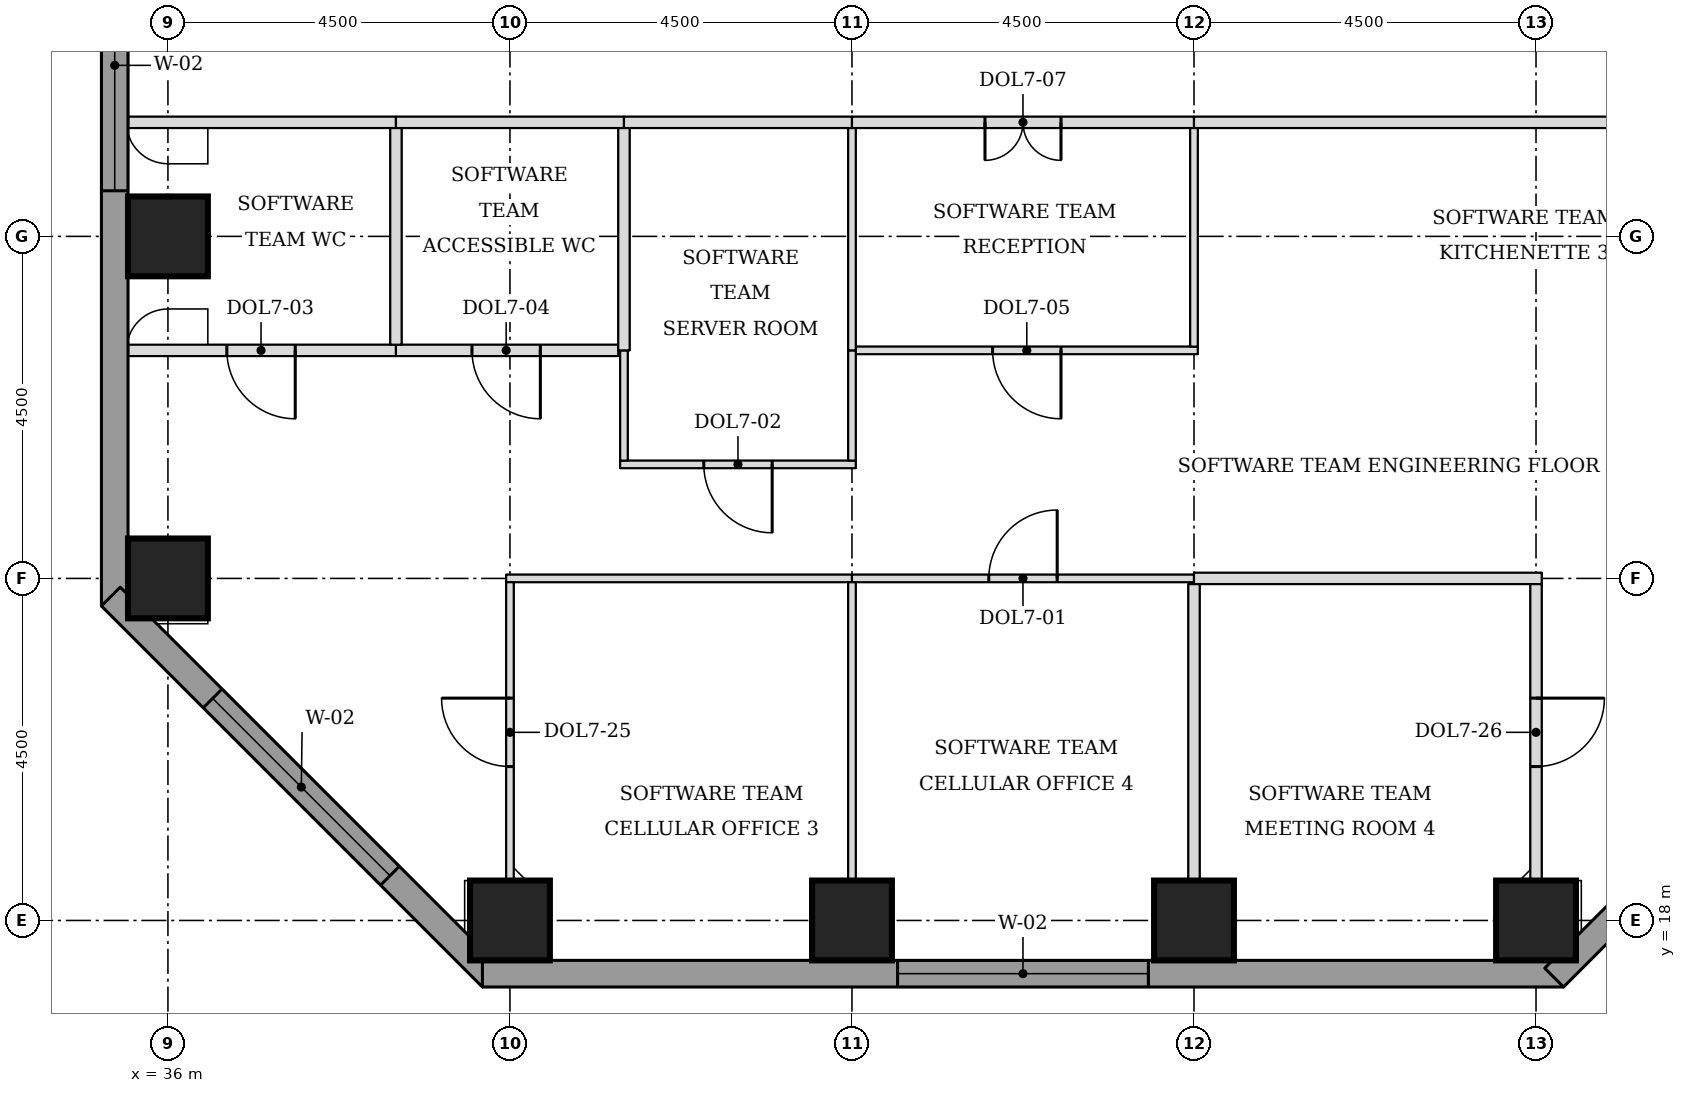
"""IFC4 building model, lengths in metres.
Left out: names, types, materials, properties, quantities, classifications, styles, units other than length and angle.
Written with IfcOpenShell. Run it as: python <this file> out.ifc"""

import sys

from ifc_helpers import new_model, si_unit, direction, frame, frame_2d, origin, origin_2d, place, context, subcontext, project, spatial, rectangle, extrude, element, fill, save


model = new_model("IFC4")
c1 = context("Model", 3, precision=1e-05, world=origin(), true_north=direction((0.0, 1.0)))
c2 = subcontext(c1, "Body", "Model", "MODEL_VIEW")
j1 = project(units=[si_unit("LENGTHUNIT", "METRE"), si_unit("PLANEANGLEUNIT", "RADIAN")], contexts=[c1])
p1 = place(None, origin())
s1 = spatial("IfcSite", under=j1, at=p1, CompositionType="ELEMENT")
p2 = place(p1, origin())
s2 = spatial("IfcBuilding", under=s1, at=p2, CompositionType="ELEMENT")
p3 = place(p2, frame((0.0, 0.0, 130.7)))
s3 = spatial("IfcBuildingStorey", under=s2, at=p3, CompositionType="ELEMENT", Elevation=130.7)
for number, where, z_axis, x_axis in (
    (1, (40.5, 18.0, 0.0), (0.0, 0.0, 1.0), (1.0, 0.0, 0.0)),
    (2, (45.0, 18.0, 0.0), (0.0, 0.0, 1.0), (1.0, 0.0, 0.0)),
    (3, (49.5, 18.0, 0.0), (0.0, 0.0, 1.0), (1.0, 0.0, 0.0)),
    (4, (54.0, 18.0, 0.0), (0.0, 0.0, 1.0), (1.0, 0.0, 0.0)),
    (5, (36.0, 22.5, 0.0), (0.0, 0.0, 1.0), (1.0, 0.0, 0.0)),
    (6, (36.0, 27.0, 0.0), (0.0, 0.0, 1.0), (1.0, 0.0, 0.0)),
):
    element("IfcColumn", number, at=place(p3, frame(where, z_axis=z_axis, x_axis=x_axis)), inside=s3, PredefinedType="COLUMN", context=c2, shape_type="SweptSolid", body=[
        extrude(rectangle(XDim=1.05, YDim=1.05, at=origin_2d()), origin(), (0.0, 0.0, 1.0), 3.7),
    ])
p4 = place(p3, frame((35.3, 39.975, 0.0), z_axis=(0.0, 0.0, 1.0), x_axis=(0.0, -1.0, 0.0)))
e7 = element("IfcWall", 7, at=p4, inside=s3, PredefinedType="STANDARD", context=c2, shape_type="SweptSolid", body=[
    extrude(rectangle(XDim=17.837, YDim=0.35, at=frame_2d((8.919, 0.0))), origin(), (0.0, 0.0, 1.0), 3.525),
])
p5 = place(p4, frame((0.5, 0.0, 0.9)))
e8 = element("IfcOpeningElement", 8, at=p5, cuts=e7, PredefinedType="OPENING", context=c2, shape_type="SweptSolid", body=[
    extrude(rectangle(XDim=3.3, YDim=1.9, at=frame_2d((1.65, 0.95))), frame((0.0, 0.185, 0.0), z_axis=(0.0, -1.0, 0.0), x_axis=(1.0, 0.0, 0.0)), (0.0, 0.0, 1.0), 0.37),
])
p6 = place(p4, frame((9.075, 0.0, 0.9)))
e9 = element("IfcOpeningElement", 9, at=p6, cuts=e7, PredefinedType="OPENING", context=c2, shape_type="SweptSolid", body=[
    extrude(rectangle(XDim=3.3, YDim=1.9, at=frame_2d((1.65, 0.95))), frame((0.0, 0.185, 0.0), z_axis=(0.0, -1.0, 0.0), x_axis=(1.0, 0.0, 0.0)), (0.0, 0.0, 1.0), 0.37),
])
p7 = place(p3, frame((35.249, 22.261, 0.0), z_axis=(0.0, 0.0, 1.0), x_axis=(0.707106781187, -0.707106781187, 0.0)))
e10 = element("IfcWall", 10, at=p7, inside=s3, PredefinedType="STANDARD", context=c2, shape_type="SweptSolid", body=[
    extrude(rectangle(XDim=7.089, YDim=0.35, at=frame_2d((3.544, 0.0))), origin(), (0.0, 0.0, 1.0), 3.525),
])
p8 = place(p7, frame((1.894, 0.0, 0.9)))
e11 = element("IfcOpeningElement", 11, at=p8, cuts=e10, PredefinedType="OPENING", context=c2, shape_type="SweptSolid", body=[
    extrude(rectangle(XDim=3.3, YDim=1.9, at=frame_2d((1.65, 0.95))), frame((0.0, 0.185, 0.0), z_axis=(0.0, -1.0, 0.0), x_axis=(1.0, 0.0, 0.0)), (0.0, 0.0, 1.0), 0.37),
])
p9 = place(p3, frame((40.138, 17.3, 0.0), z_axis=(0.0, 0.0, 1.0), x_axis=(1.0, 0.0, 0.0)))
e12 = element("IfcWall", 12, at=p9, inside=s3, PredefinedType="STANDARD", context=c2, shape_type="SweptSolid", body=[
    extrude(rectangle(XDim=14.225, YDim=0.35, at=frame_2d((7.112, 0.0))), origin(), (0.0, 0.0, 1.0), 3.525),
])
p10 = place(p9, frame((5.462, 0.0, 0.9)))
e13 = element("IfcOpeningElement", 13, at=p10, cuts=e12, PredefinedType="OPENING", context=c2, shape_type="SweptSolid", body=[
    extrude(rectangle(XDim=3.3, YDim=1.9, at=frame_2d((1.65, 0.95))), frame((0.0, 0.185, 0.0), z_axis=(0.0, -1.0, 0.0), x_axis=(1.0, 0.0, 0.0)), (0.0, 0.0, 1.0), 0.37),
])
p11 = place(p3, frame((54.239, 17.249, 0.0), z_axis=(0.0, 0.0, 1.0), x_axis=(0.707106781187, 0.707106781187, 0.0)))
e14 = element("IfcWall", 14, at=p11, inside=s3, PredefinedType="STANDARD", context=c2, shape_type="SweptSolid", body=[
    extrude(rectangle(XDim=7.089, YDim=0.35, at=frame_2d((3.544, 0.0))), origin(), (0.0, 0.0, 1.0), 3.525),
])
p12 = place(p11, frame((1.894, 0.0, 0.9)))
e15 = element("IfcOpeningElement", 15, at=p12, cuts=e14, PredefinedType="OPENING", context=c2, shape_type="SweptSolid", body=[
    extrude(rectangle(XDim=3.3, YDim=1.9, at=frame_2d((1.65, 0.95))), frame((0.0, 0.185, 0.0), z_axis=(0.0, -1.0, 0.0), x_axis=(1.0, 0.0, 0.0)), (0.0, 0.0, 1.0), 0.37),
])
p13 = place(p3, frame((40.45, 22.5, 0.0), z_axis=(0.0, 0.0, 1.0), x_axis=(1.0, 0.0, 0.0)))
e16 = element("IfcWall", 16, at=p13, inside=s3, PredefinedType="PARTITIONING", context=c2, shape_type="SweptSolid", body=[
    extrude(rectangle(XDim=4.55, YDim=0.1, at=frame_2d((2.275, 0.0))), origin(), (0.0, 0.0, 1.0), 2.55),
])
p14 = place(p3, frame((45.0, 22.5, 0.0), z_axis=(0.0, 0.0, 1.0), x_axis=(1.0, 0.0, 0.0)))
e17 = element("IfcWall", 17, at=p14, inside=s3, PredefinedType="PARTITIONING", context=c2, shape_type="SweptSolid", body=[
    extrude(rectangle(XDim=4.5, YDim=0.1, at=frame_2d((2.25, 0.0))), origin(), (0.0, 0.0, 1.0), 2.55),
])
p15 = place(p14, frame((1.8, 0.0, 0.0)))
e18 = element("IfcOpeningElement", 18, at=p15, cuts=e17, PredefinedType="OPENING", context=c2, shape_type="SweptSolid", body=[
    extrude(rectangle(XDim=0.9, YDim=2.1, at=frame_2d((0.45, 1.05))), frame((0.0, 0.06, 0.0), z_axis=(0.0, -1.0, 0.0), x_axis=(1.0, 0.0, 0.0)), (0.0, 0.0, 1.0), 0.12),
])
p16 = place(p3, frame((49.5, 22.5, 0.0), z_axis=(0.0, 0.0, 1.0), x_axis=(1.0, 0.0, 0.0)))
e19 = element("IfcWall", 19, at=p16, inside=s3, PredefinedType="PARTITIONING", context=c2, shape_type="SweptSolid", body=[
    extrude(rectangle(XDim=4.575, YDim=0.15, at=frame_2d((2.288, 0.0))), origin(), (0.0, 0.0, 1.0), 2.55),
])
p17 = place(p3, frame((41.95, 24.0, 0.0), z_axis=(0.0, 0.0, 1.0), x_axis=(1.0, 0.0, 0.0)))
e20 = element("IfcWall", 20, at=p17, inside=s3, PredefinedType="PARTITIONING", context=c2, shape_type="SweptSolid", body=[
    extrude(rectangle(XDim=3.1, YDim=0.1, at=frame_2d((1.55, 0.0))), origin(), (0.0, 0.0, 1.0), 3.55),
])
p18 = place(p17, frame((1.1, 0.0, 0.0)))
e21 = element("IfcOpeningElement", 21, at=p18, cuts=e20, PredefinedType="OPENING", context=c2, shape_type="SweptSolid", body=[
    extrude(rectangle(XDim=0.9, YDim=2.1, at=frame_2d((0.45, 1.05))), frame((0.0, 0.06, 0.0), z_axis=(0.0, -1.0, 0.0), x_axis=(1.0, 0.0, 0.0)), (0.0, 0.0, 1.0), 0.12),
])
p19 = place(p3, frame((35.475, 25.5, 0.0), z_axis=(0.0, 0.0, 1.0), x_axis=(1.0, 0.0, 0.0)))
e22 = element("IfcWall", 22, at=p19, inside=s3, PredefinedType="PARTITIONING", context=c2, shape_type="SweptSolid", body=[
    extrude(rectangle(XDim=3.525, YDim=0.15, at=frame_2d((1.762, 0.0))), origin(), (0.0, 0.0, 1.0), 3.55),
])
p20 = place(p19, frame((1.3, 0.0, 0.0)))
e23 = element("IfcOpeningElement", 23, at=p20, cuts=e22, PredefinedType="OPENING", context=c2, shape_type="SweptSolid", body=[
    extrude(rectangle(XDim=0.9, YDim=2.1, at=frame_2d((0.45, 1.05))), frame((0.0, 0.085, 0.0), z_axis=(0.0, -1.0, 0.0), x_axis=(1.0, 0.0, 0.0)), (0.0, 0.0, 1.0), 0.17),
])
p21 = place(p3, frame((39.0, 25.5, 0.0), z_axis=(0.0, 0.0, 1.0), x_axis=(1.0, 0.0, 0.0)))
e24 = element("IfcWall", 24, at=p21, inside=s3, PredefinedType="PARTITIONING", context=c2, shape_type="SweptSolid", body=[
    extrude(rectangle(XDim=2.925, YDim=0.15, at=frame_2d((1.462, 0.0))), origin(), (0.0, 0.0, 1.0), 3.55),
])
p22 = place(p21, frame((1.0, 0.0, 0.0)))
e25 = element("IfcOpeningElement", 25, at=p22, cuts=e24, PredefinedType="OPENING", context=c2, shape_type="SweptSolid", body=[
    extrude(rectangle(XDim=0.9, YDim=2.1, at=frame_2d((0.45, 1.05))), frame((0.0, 0.085, 0.0), z_axis=(0.0, -1.0, 0.0), x_axis=(1.0, 0.0, 0.0)), (0.0, 0.0, 1.0), 0.17),
])
p23 = place(p3, frame((45.05, 25.5, 0.0), z_axis=(0.0, 0.0, 1.0), x_axis=(1.0, 0.0, 0.0)))
e26 = element("IfcWall", 26, at=p23, inside=s3, PredefinedType="PARTITIONING", context=c2, shape_type="SweptSolid", body=[
    extrude(rectangle(XDim=4.5, YDim=0.1, at=frame_2d((2.25, 0.0))), origin(), (0.0, 0.0, 1.0), 3.55),
])
p24 = place(p23, frame((1.8, 0.0, 0.0)))
e27 = element("IfcOpeningElement", 27, at=p24, cuts=e26, PredefinedType="OPENING", context=c2, shape_type="SweptSolid", body=[
    extrude(rectangle(XDim=0.9, YDim=2.1, at=frame_2d((0.45, 1.05))), frame((0.0, 0.06, 0.0), z_axis=(0.0, -1.0, 0.0), x_axis=(1.0, 0.0, 0.0)), (0.0, 0.0, 1.0), 0.12),
])
p25 = place(p3, frame((35.475, 28.5, 0.0), z_axis=(0.0, 0.0, 1.0), x_axis=(1.0, 0.0, 0.0)))
e28 = element("IfcWall", 28, at=p25, inside=s3, PredefinedType="PARTITIONING", context=c2, shape_type="SweptSolid", body=[
    extrude(rectangle(XDim=3.525, YDim=0.15, at=frame_2d((1.762, 0.0))), origin(), (0.0, 0.0, 1.0), 3.55),
])
for number, where, z_axis, x_axis in (
    (29, (39.0, 28.5, 0.0), (0.0, 0.0, 1.0), (1.0, 0.0, 0.0)),
    (30, (42.0, 28.5, 0.0), (0.0, 0.0, 1.0), (1.0, 0.0, 0.0)),
):
    element("IfcWall", number, at=place(p3, frame(where, z_axis=z_axis, x_axis=x_axis)), inside=s3, PredefinedType="PARTITIONING", context=c2, shape_type="SweptSolid", body=[
        extrude(rectangle(XDim=3.0, YDim=0.15, at=frame_2d((1.5, 0.0))), origin(), (0.0, 0.0, 1.0), 3.55),
    ])
p26 = place(p3, frame((45.0, 28.5, 0.0), z_axis=(0.0, 0.0, 1.0), x_axis=(1.0, 0.0, 0.0)))
e31 = element("IfcWall", 31, at=p26, inside=s3, PredefinedType="PARTITIONING", context=c2, shape_type="SweptSolid", body=[
    extrude(rectangle(XDim=4.5, YDim=0.15, at=frame_2d((2.25, 0.0))), origin(), (0.0, 0.0, 1.0), 3.55),
])
p27 = place(p26, frame((1.75, 0.0, 0.0)))
e32 = element("IfcOpeningElement", 32, at=p27, cuts=e31, PredefinedType="OPENING", context=c2, shape_type="SweptSolid", body=[
    extrude(rectangle(XDim=1.0, YDim=2.1, at=frame_2d((0.5, 1.05))), frame((0.0, 0.085, 0.0), z_axis=(0.0, -1.0, 0.0), x_axis=(1.0, 0.0, 0.0)), (0.0, 0.0, 1.0), 0.17),
])
p28 = place(p3, frame((49.5, 28.5, 0.0), z_axis=(0.0, 0.0, 1.0), x_axis=(1.0, 0.0, 0.0)))
e33 = element("IfcWall", 33, at=p28, inside=s3, PredefinedType="PARTITIONING", context=c2, shape_type="SweptSolid", body=[
    extrude(rectangle(XDim=6.0, YDim=0.15, at=frame_2d((3.0, 0.0))), origin(), (0.0, 0.0, 1.0), 3.55),
])
p29 = place(p3, frame((45.0, 17.475, 0.0), z_axis=(0.0, 0.0, 1.0), x_axis=(0.0, 1.0, 0.0)))
e34 = element("IfcWall", 34, at=p29, inside=s3, PredefinedType="PARTITIONING", context=c2, shape_type="SweptSolid", body=[
    extrude(rectangle(XDim=4.975, YDim=0.1, at=frame_2d((2.487, 0.0))), origin(), (0.0, 0.0, 1.0), 3.55),
])
p30 = place(p3, frame((49.5, 17.475, 0.0), z_axis=(0.0, 0.0, 1.0), x_axis=(0.0, 1.0, 0.0)))
e35 = element("IfcWall", 35, at=p30, inside=s3, PredefinedType="PARTITIONING", context=c2, shape_type="SweptSolid", body=[
    extrude(rectangle(XDim=4.95, YDim=0.15, at=frame_2d((2.475, 0.0))), origin(), (0.0, 0.0, 1.0), 3.55),
])
p31 = place(p3, frame((40.5, 18.525, 0.0), z_axis=(0.0, 0.0, 1.0), x_axis=(0.0, 1.0, 0.0)))
e36 = element("IfcWall", 36, at=p31, inside=s3, PredefinedType="PARTITIONING", context=c2, shape_type="SweptSolid", body=[
    extrude(rectangle(XDim=3.925, YDim=0.1, at=frame_2d((1.962, 0.0))), origin(), (0.0, 0.0, 1.0), 3.55),
])
p32 = place(p31, frame((1.5, 0.0, 0.0)))
e37 = element("IfcOpeningElement", 37, at=p32, cuts=e36, PredefinedType="OPENING", context=c2, shape_type="SweptSolid", body=[
    extrude(rectangle(XDim=0.9, YDim=2.1, at=frame_2d((0.45, 1.05))), frame((0.0, 0.06, 0.0), z_axis=(0.0, -1.0, 0.0), x_axis=(1.0, 0.0, 0.0)), (0.0, 0.0, 1.0), 0.12),
])
p33 = place(p3, frame((54.0, 18.525, 0.0), z_axis=(0.0, 0.0, 1.0), x_axis=(0.0, 1.0, 0.0)))
e38 = element("IfcWall", 38, at=p33, inside=s3, PredefinedType="PARTITIONING", context=c2, shape_type="SweptSolid", body=[
    extrude(rectangle(XDim=3.9, YDim=0.15, at=frame_2d((1.95, 0.0))), origin(), (0.0, 0.0, 1.0), 3.55),
])
p34 = place(p33, frame((1.5, 0.0, 0.0)))
e39 = element("IfcOpeningElement", 39, at=p34, cuts=e38, PredefinedType="OPENING", context=c2, shape_type="SweptSolid", body=[
    extrude(rectangle(XDim=0.9, YDim=2.1, at=frame_2d((0.45, 1.05))), frame((0.0, 0.085, 0.0), z_axis=(0.0, -1.0, 0.0), x_axis=(1.0, 0.0, 0.0)), (0.0, 0.0, 1.0), 0.17),
])
for number, where, z_axis, x_axis in (
    (40, (42.0, 24.05, 0.0), (0.0, 0.0, 1.0), (0.0, 1.0, 0.0)),
    (41, (45.0, 24.05, 0.0), (0.0, 0.0, 1.0), (0.0, 1.0, 0.0)),
):
    element("IfcWall", number, at=place(p3, frame(where, z_axis=z_axis, x_axis=x_axis)), inside=s3, PredefinedType="PARTITIONING", context=c2, shape_type="SweptSolid", body=[
        extrude(rectangle(XDim=1.45, YDim=0.1, at=frame_2d((0.725, 0.0))), origin(), (0.0, 0.0, 1.0), 3.55),
    ])
p35 = place(p3, frame((42.0, 25.5, 0.0), z_axis=(0.0, 0.0, 1.0), x_axis=(0.0, 1.0, 0.0)))
e42 = element("IfcWall", 42, at=p35, inside=s3, PredefinedType="PARTITIONING", context=c2, shape_type="SweptSolid", body=[
    extrude(rectangle(XDim=2.925, YDim=0.15, at=frame_2d((1.462, 0.0))), origin(), (0.0, 0.0, 1.0), 3.55),
])
p36 = place(p3, frame((45.0, 25.5, 0.0), z_axis=(0.0, 0.0, 1.0), x_axis=(0.0, 1.0, 0.0)))
e43 = element("IfcWall", 43, at=p36, inside=s3, PredefinedType="PARTITIONING", context=c2, shape_type="SweptSolid", body=[
    extrude(rectangle(XDim=2.925, YDim=0.1, at=frame_2d((1.462, 0.0))), origin(), (0.0, 0.0, 1.0), 3.55),
])
p37 = place(p3, frame((49.5, 25.55, 0.0), z_axis=(0.0, 0.0, 1.0), x_axis=(0.0, 1.0, 0.0)))
e44 = element("IfcWall", 44, at=p37, inside=s3, PredefinedType="PARTITIONING", context=c2, shape_type="SweptSolid", body=[
    extrude(rectangle(XDim=2.875, YDim=0.1, at=frame_2d((1.438, 0.0))), origin(), (0.0, 0.0, 1.0), 3.55),
])
p38 = place(p3, frame((39.0, 25.575, 0.0), z_axis=(0.0, 0.0, 1.0), x_axis=(0.0, 1.0, 0.0)))
e45 = element("IfcWall", 45, at=p38, inside=s3, PredefinedType="PARTITIONING", context=c2, shape_type="SweptSolid", body=[
    extrude(rectangle(XDim=2.85, YDim=0.15, at=frame_2d((1.425, 0.0))), origin(), (0.0, 0.0, 1.0), 3.55),
])
p39 = place(p6, origin())
e46 = element("IfcWindow", 46, at=p39, inside=s3, PartitioningType="SINGLE_PANEL", PredefinedType="WINDOW", context=c2, shape_type="SweptSolid", body=[
    extrude(rectangle(XDim=3.3, YDim=1.9, at=frame_2d((1.65, 0.95))), frame((0.0, 0.085, 0.0), z_axis=(0.0, -1.0, 0.0), x_axis=(1.0, 0.0, 0.0)), (0.0, 0.0, 1.0), 0.06),
])
fill(e9, e46)
p40 = place(p8, origin())
e47 = element("IfcWindow", 47, at=p40, inside=s3, PartitioningType="SINGLE_PANEL", PredefinedType="WINDOW", context=c2, shape_type="SweptSolid", body=[
    extrude(rectangle(XDim=3.3, YDim=1.9, at=frame_2d((1.65, 0.95))), frame((0.0, 0.085, 0.0), z_axis=(0.0, -1.0, 0.0), x_axis=(1.0, 0.0, 0.0)), (0.0, 0.0, 1.0), 0.06),
])
fill(e11, e47)
p41 = place(p10, origin())
e48 = element("IfcWindow", 48, at=p41, inside=s3, PartitioningType="SINGLE_PANEL", PredefinedType="WINDOW", context=c2, shape_type="SweptSolid", body=[
    extrude(rectangle(XDim=3.3, YDim=1.9, at=frame_2d((1.65, 0.95))), frame((0.0, 0.085, 0.0), z_axis=(0.0, -1.0, 0.0), x_axis=(1.0, 0.0, 0.0)), (0.0, 0.0, 1.0), 0.06),
])
fill(e13, e48)
p42 = place(p27, frame((1.0, 0.0, 0.0), z_axis=(0.0, 0.0, 1.0), x_axis=(-1.0, 0.0, 0.0)))
e49 = element("IfcDoor", 49, at=p42, inside=s3, OperationType="DOUBLE_DOOR_SINGLE_SWING", PredefinedType="DOOR", context=c2, shape_type="SweptSolid", body=[
    extrude(rectangle(XDim=1.0, YDim=2.1, at=frame_2d((0.5, 1.05))), frame((0.0, 0.025, 0.0), z_axis=(0.0, -1.0, 0.0), x_axis=(1.0, 0.0, 0.0)), (0.0, 0.0, 1.0), 0.05),
])
fill(e32, e49)
p43 = place(p24, frame((0.9, 0.0, 0.0), z_axis=(0.0, 0.0, 1.0), x_axis=(-1.0, 0.0, 0.0)))
e50 = element("IfcDoor", 50, at=p43, inside=s3, OperationType="SINGLE_SWING_LEFT", PredefinedType="DOOR", context=c2, shape_type="SweptSolid", body=[
    extrude(rectangle(XDim=0.9, YDim=2.1, at=frame_2d((0.45, 1.05))), frame((0.0, 0.025, 0.0), z_axis=(0.0, -1.0, 0.0), x_axis=(1.0, 0.0, 0.0)), (0.0, 0.0, 1.0), 0.05),
])
fill(e27, e50)
p44 = place(p22, frame((0.9, 0.0, 0.0), z_axis=(0.0, 0.0, 1.0), x_axis=(-1.0, 0.0, 0.0)))
e51 = element("IfcDoor", 51, at=p44, inside=s3, OperationType="SINGLE_SWING_LEFT", PredefinedType="DOOR", context=c2, shape_type="SweptSolid", body=[
    extrude(rectangle(XDim=0.9, YDim=2.1, at=frame_2d((0.45, 1.05))), frame((0.0, 0.025, 0.0), z_axis=(0.0, -1.0, 0.0), x_axis=(1.0, 0.0, 0.0)), (0.0, 0.0, 1.0), 0.05),
])
fill(e25, e51)
p45 = place(p32, origin())
e52 = element("IfcDoor", 52, at=p45, inside=s3, OperationType="SINGLE_SWING_RIGHT", PredefinedType="DOOR", context=c2, shape_type="SweptSolid", body=[
    extrude(rectangle(XDim=0.9, YDim=2.1, at=frame_2d((0.45, 1.05))), frame((0.0, 0.025, 0.0), z_axis=(0.0, -1.0, 0.0), x_axis=(1.0, 0.0, 0.0)), (0.0, 0.0, 1.0), 0.05),
])
fill(e37, e52)
p46 = place(p15, origin())
e53 = element("IfcDoor", 53, at=p46, inside=s3, OperationType="SINGLE_SWING_RIGHT", PredefinedType="DOOR", context=c2, shape_type="SweptSolid", body=[
    extrude(rectangle(XDim=0.9, YDim=2.1, at=frame_2d((0.45, 1.05))), frame((0.0, 0.025, 0.0), z_axis=(0.0, -1.0, 0.0), x_axis=(1.0, 0.0, 0.0)), (0.0, 0.0, 1.0), 0.05),
])
fill(e18, e53)
p47 = place(p34, frame((0.9, 0.0, 0.0), z_axis=(0.0, 0.0, 1.0), x_axis=(-1.0, 0.0, 0.0)))
e54 = element("IfcDoor", 54, at=p47, inside=s3, OperationType="SINGLE_SWING_LEFT", PredefinedType="DOOR", context=c2, shape_type="SweptSolid", body=[
    extrude(rectangle(XDim=0.9, YDim=2.1, at=frame_2d((0.45, 1.05))), frame((0.0, 0.025, 0.0), z_axis=(0.0, -1.0, 0.0), x_axis=(1.0, 0.0, 0.0)), (0.0, 0.0, 1.0), 0.05),
])
fill(e39, e54)
p48 = place(p18, frame((0.9, 0.0, 0.0), z_axis=(0.0, 0.0, 1.0), x_axis=(-1.0, 0.0, 0.0)))
e55 = element("IfcDoor", 55, at=p48, inside=s3, OperationType="SINGLE_SWING_LEFT", PredefinedType="DOOR", context=c2, shape_type="SweptSolid", body=[
    extrude(rectangle(XDim=0.9, YDim=2.1, at=frame_2d((0.45, 1.05))), frame((0.0, 0.025, 0.0), z_axis=(0.0, -1.0, 0.0), x_axis=(1.0, 0.0, 0.0)), (0.0, 0.0, 1.0), 0.05),
])
fill(e21, e55)
p49 = place(p20, frame((0.9, 0.0, 0.0), z_axis=(0.0, 0.0, 1.0), x_axis=(-1.0, 0.0, 0.0)))
e56 = element("IfcDoor", 56, at=p49, inside=s3, OperationType="SINGLE_SWING_LEFT", PredefinedType="DOOR", context=c2, shape_type="SweptSolid", body=[
    extrude(rectangle(XDim=0.9, YDim=2.1, at=frame_2d((0.45, 1.05))), frame((0.0, 0.025, 0.0), z_axis=(0.0, -1.0, 0.0), x_axis=(1.0, 0.0, 0.0)), (0.0, 0.0, 1.0), 0.05),
])
fill(e23, e56)
save(model, sys.argv[1])
